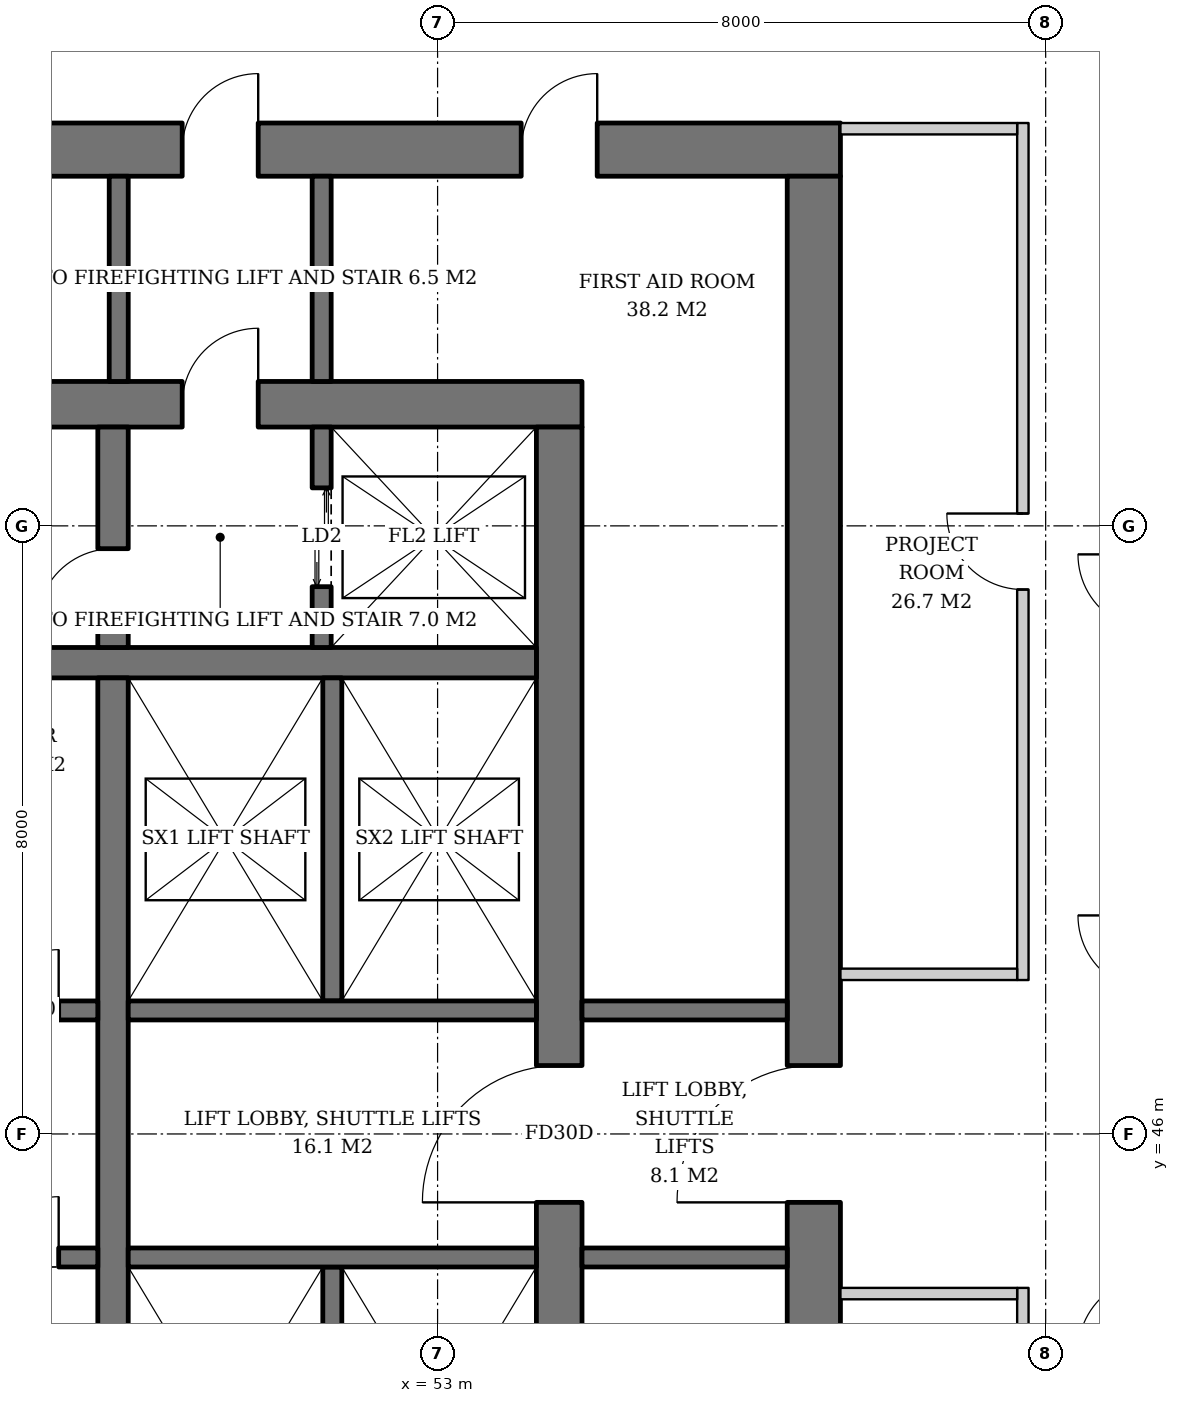
"""IFC4 building model, lengths in metres.
Left out: names, types, materials, properties, quantities, classifications, styles, units other than length and angle.
Written with IfcOpenShell. Run it as: python <this file> out.ifc"""

import sys

from ifc_helpers import new_model, si_unit, direction, frame, frame_2d, origin, place, context, subcontext, project, spatial, rectangle, extrude, element, fill, save


model = new_model("IFC4")
c1 = context("Model", 3, precision=1e-05, world=origin(), true_north=direction((0.0, 1.0)))
c2 = subcontext(c1, "Body", "Model", "MODEL_VIEW")
j1 = project(units=[si_unit("LENGTHUNIT", "METRE"), si_unit("PLANEANGLEUNIT", "RADIAN")], contexts=[c1])
p1 = place(None, origin())
s1 = spatial("IfcSite", under=j1, at=p1, CompositionType="ELEMENT")
p2 = place(p1, origin())
s2 = spatial("IfcBuilding", under=s1, at=p2, CompositionType="ELEMENT")
p3 = place(p2, frame((0.0, 0.0, 112.2)))
s3 = spatial("IfcBuildingStorey", under=s2, at=p3, CompositionType="ELEMENT", Elevation=112.2)
p4 = place(p3, frame((35.1, 55.6, 0.0), z_axis=(0.0, 0.0, 1.0), x_axis=(1.0, 0.0, 0.0)))
e1 = element("IfcWall", 1, at=p4, inside=s3, PredefinedType="SHEAR", context=c2, shape_type="SweptSolid", body=[
    extrude(rectangle(XDim=19.8, YDim=0.6, at=frame_2d((9.9, 0.0))), origin(), (0.0, 0.0, 1.0), 3.8),
])
p5 = place(p4, frame((14.54, 0.0, 0.0)))
e2 = element("IfcOpeningElement", 2, at=p5, cuts=e1, PredefinedType="OPENING", context=c2, shape_type="SweptSolid", body=[
    extrude(rectangle(XDim=1.0, YDim=2.1, at=frame_2d((0.5, 1.05))), frame((0.0, 0.31, 0.0), z_axis=(0.0, -1.0, 0.0), x_axis=(1.0, 0.0, 0.0)), (0.0, 0.0, 1.0), 0.62),
])
p6 = place(p4, frame((2.425, 0.0, 0.0)))
e3 = element("IfcOpeningElement", 3, at=p6, cuts=e1, PredefinedType="OPENING", context=c2, shape_type="SweptSolid", body=[
    extrude(rectangle(XDim=1.0, YDim=2.1, at=frame_2d((0.5, 1.05))), frame((0.0, 0.31, 0.0), z_axis=(0.0, -1.0, 0.0), x_axis=(1.0, 0.0, 0.0)), (0.0, 0.0, 1.0), 0.62),
])
p7 = place(p3, frame((54.6, 36.7, 0.0), z_axis=(0.0, 0.0, 1.0), x_axis=(0.0, 1.0, 0.0)))
e4 = element("IfcWall", 4, at=p7, inside=s3, PredefinedType="SHEAR", context=c2, shape_type="SweptSolid", body=[
    extrude(rectangle(XDim=18.6, YDim=0.6, at=frame_2d((9.3, 0.0))), origin(), (0.0, 0.0, 1.0), 3.8),
])
p8 = place(p7, frame((8.4, 0.0, 0.0)))
e5 = element("IfcOpeningElement", 5, at=p8, cuts=e4, PredefinedType="OPENING", context=c2, shape_type="SweptSolid", body=[
    extrude(rectangle(XDim=1.8, YDim=2.4, at=frame_2d((0.9, 1.2))), frame((0.0, 0.31, 0.0), z_axis=(0.0, -1.0, 0.0), x_axis=(1.0, 0.0, 0.0)), (0.0, 0.0, 1.0), 0.62),
])
p9 = place(p3, frame((31.7, 58.95, 0.0), z_axis=(0.0, 0.0, 1.0), x_axis=(1.0, 0.0, 0.0)))
e6 = element("IfcWall", 6, at=p9, inside=s3, PredefinedType="SHEAR", context=c2, shape_type="SweptSolid", body=[
    extrude(rectangle(XDim=26.6, YDim=0.7, at=frame_2d((13.3, 0.0))), origin(), (0.0, 0.0, 1.0), 3.8),
])
p10 = place(p9, frame((17.94, 0.0, 0.0)))
e7 = element("IfcOpeningElement", 7, at=p10, cuts=e6, PredefinedType="OPENING", context=c2, shape_type="SweptSolid", body=[
    extrude(rectangle(XDim=1.0, YDim=2.1, at=frame_2d((0.5, 1.05))), frame((0.0, 0.36, 0.0), z_axis=(0.0, -1.0, 0.0), x_axis=(1.0, 0.0, 0.0)), (0.0, 0.0, 1.0), 0.72),
])
p11 = place(p9, frame((5.825, 0.0, 0.0)))
e8 = element("IfcOpeningElement", 8, at=p11, cuts=e6, PredefinedType="OPENING", context=c2, shape_type="SweptSolid", body=[
    extrude(rectangle(XDim=1.0, YDim=2.1, at=frame_2d((0.5, 1.05))), frame((0.0, 0.36, 0.0), z_axis=(0.0, -1.0, 0.0), x_axis=(1.0, 0.0, 0.0)), (0.0, 0.0, 1.0), 0.72),
])
p12 = place(p9, frame((1.169, 0.0, 0.0)))
e9 = element("IfcOpeningElement", 9, at=p12, cuts=e6, PredefinedType="OPENING", context=c2, shape_type="SweptSolid", body=[
    extrude(rectangle(XDim=1.0, YDim=2.1, at=frame_2d((0.5, 1.05))), frame((0.0, 0.36, 0.0), z_axis=(0.0, -1.0, 0.0), x_axis=(1.0, 0.0, 0.0)), (0.0, 0.0, 1.0), 0.72),
])
p13 = place(p9, frame((2.683, 0.0, 0.0)))
e10 = element("IfcOpeningElement", 10, at=p13, cuts=e6, PredefinedType="OPENING", context=c2, shape_type="SweptSolid", body=[
    extrude(rectangle(XDim=1.0, YDim=2.1, at=frame_2d((0.5, 1.05))), frame((0.0, 0.36, 0.0), z_axis=(0.0, -1.0, 0.0), x_axis=(1.0, 0.0, 0.0)), (0.0, 0.0, 1.0), 0.72),
])
p14 = place(p9, frame((4.211, 0.0, 0.0)))
e11 = element("IfcOpeningElement", 11, at=p14, cuts=e6, PredefinedType="OPENING", context=c2, shape_type="SweptSolid", body=[
    extrude(rectangle(XDim=1.0, YDim=2.1, at=frame_2d((0.5, 1.05))), frame((0.0, 0.36, 0.0), z_axis=(0.0, -1.0, 0.0), x_axis=(1.0, 0.0, 0.0)), (0.0, 0.0, 1.0), 0.72),
])
p15 = place(p9, frame((9.126, 0.0, 0.0)))
e12 = element("IfcOpeningElement", 12, at=p15, cuts=e6, PredefinedType="OPENING", context=c2, shape_type="SweptSolid", body=[
    extrude(rectangle(XDim=1.0, YDim=2.1, at=frame_2d((0.5, 1.05))), frame((0.0, 0.36, 0.0), z_axis=(0.0, -1.0, 0.0), x_axis=(1.0, 0.0, 0.0)), (0.0, 0.0, 1.0), 0.72),
])
p16 = place(p9, frame((14.029, 0.0, 0.0)))
e13 = element("IfcOpeningElement", 13, at=p16, cuts=e6, PredefinedType="OPENING", context=c2, shape_type="SweptSolid", body=[
    extrude(rectangle(XDim=1.0, YDim=2.1, at=frame_2d((0.5, 1.05))), frame((0.0, 0.36, 0.0), z_axis=(0.0, -1.0, 0.0), x_axis=(1.0, 0.0, 0.0)), (0.0, 0.0, 1.0), 0.72),
])
p17 = place(p9, frame((22.4, 0.0, 0.0)))
e14 = element("IfcOpeningElement", 14, at=p17, cuts=e6, PredefinedType="OPENING", context=c2, shape_type="SweptSolid", body=[
    extrude(rectangle(XDim=1.0, YDim=2.1, at=frame_2d((0.5, 1.05))), frame((0.0, 0.36, 0.0), z_axis=(0.0, -1.0, 0.0), x_axis=(1.0, 0.0, 0.0)), (0.0, 0.0, 1.0), 0.72),
])
p18 = place(p3, frame((57.95, 33.4, 0.0), z_axis=(0.0, 0.0, 1.0), x_axis=(0.0, 1.0, 0.0)))
e15 = element("IfcWall", 15, at=p18, inside=s3, PredefinedType="SHEAR", context=c2, shape_type="SweptSolid", body=[
    extrude(rectangle(XDim=25.2, YDim=0.7, at=frame_2d((12.6, 0.0))), origin(), (0.0, 0.0, 1.0), 3.8),
])
p19 = place(p18, frame((11.7, 0.0, 0.0)))
e16 = element("IfcOpeningElement", 16, at=p19, cuts=e15, PredefinedType="OPENING", context=c2, shape_type="SweptSolid", body=[
    extrude(rectangle(XDim=1.8, YDim=2.4, at=frame_2d((0.9, 1.2))), frame((0.0, 0.36, 0.0), z_axis=(0.0, -1.0, 0.0), x_axis=(1.0, 0.0, 0.0)), (0.0, 0.0, 1.0), 0.72),
])
p20 = place(p3, frame((35.7, 52.2, 0.0), z_axis=(0.0, 0.0, 1.0), x_axis=(1.0, 0.0, 0.0)))
e17 = element("IfcWall", 17, at=p20, inside=s3, PredefinedType="SHEAR", context=c2, shape_type="SweptSolid", body=[
    extrude(rectangle(XDim=18.6, YDim=0.4, at=frame_2d((9.3, 0.0))), origin(), (0.0, 0.0, 1.0), 3.8),
])
p21 = place(p3, frame((48.73, 40.0, 0.0), z_axis=(0.0, 0.0, 1.0), x_axis=(0.0, 1.0, 0.0)))
e18 = element("IfcWall", 18, at=p21, inside=s3, PredefinedType="SHEAR", context=c2, shape_type="SweptSolid", body=[
    extrude(rectangle(XDim=12.0, YDim=0.4, at=frame_2d((6.0, 0.0))), origin(), (0.0, 0.0, 1.0), 3.8),
])
p22 = place(p3, frame((48.73, 52.4, 0.0), z_axis=(0.0, 0.0, 1.0), x_axis=(0.0, 1.0, 0.0)))
e19 = element("IfcWall", 19, at=p22, inside=s3, PredefinedType="SHEAR", context=c2, shape_type="SweptSolid", body=[
    extrude(rectangle(XDim=2.9, YDim=0.4, at=frame_2d((1.45, 0.0))), origin(), (0.0, 0.0, 1.0), 3.8),
])
p23 = place(p22, frame((0.3, 0.0, 0.0)))
e20 = element("IfcOpeningElement", 20, at=p23, cuts=e19, PredefinedType="OPENING", context=c2, shape_type="SweptSolid", body=[
    extrude(rectangle(XDim=1.0, YDim=2.1, at=frame_2d((0.5, 1.05))), frame((0.0, 0.21, 0.0), z_axis=(0.0, -1.0, 0.0), x_axis=(1.0, 0.0, 0.0)), (0.0, 0.0, 1.0), 0.42),
])
p24 = place(p3, frame((51.475, 52.4, 0.0), z_axis=(0.0, 0.0, 1.0), x_axis=(0.0, 1.0, 0.0)))
e21 = element("IfcWall", 21, at=p24, inside=s3, PredefinedType="SHEAR", context=c2, shape_type="SweptSolid", body=[
    extrude(rectangle(XDim=2.9, YDim=0.25, at=frame_2d((1.45, 0.0))), origin(), (0.0, 0.0, 1.0), 3.8),
])
p25 = place(p24, frame((0.8, 0.0, 0.0)))
e22 = element("IfcOpeningElement", 22, at=p25, cuts=e21, PredefinedType="OPENING", context=c2, shape_type="SweptSolid", body=[
    extrude(rectangle(XDim=1.3, YDim=2.2, at=frame_2d((0.65, 1.1))), frame((0.0, 0.135, 0.0), z_axis=(0.0, -1.0, 0.0), x_axis=(1.0, 0.0, 0.0)), (0.0, 0.0, 1.0), 0.27),
])
p26 = place(p3, frame((35.7, 47.625, 0.0), z_axis=(0.0, 0.0, 1.0), x_axis=(1.0, 0.0, 0.0)))
e23 = element("IfcWall", 23, at=p26, inside=s3, PredefinedType="SHEAR", context=c2, shape_type="SweptSolid", body=[
    extrude(rectangle(XDim=12.83, YDim=0.25, at=frame_2d((6.415, 0.0))), origin(), (0.0, 0.0, 1.0), 3.8),
])
p27 = place(p26, frame((0.7, 0.0, 0.0)))
e24 = element("IfcOpeningElement", 24, at=p27, cuts=e23, PredefinedType="OPENING", context=c2, shape_type="SweptSolid", body=[
    extrude(rectangle(XDim=1.1, YDim=2.2, at=frame_2d((0.55, 1.1))), frame((0.0, 0.135, 0.0), z_axis=(0.0, -1.0, 0.0), x_axis=(1.0, 0.0, 0.0)), (0.0, 0.0, 1.0), 0.27),
])
p28 = place(p26, frame((3.45, 0.0, 0.0)))
e25 = element("IfcOpeningElement", 25, at=p28, cuts=e23, PredefinedType="OPENING", context=c2, shape_type="SweptSolid", body=[
    extrude(rectangle(XDim=1.1, YDim=2.2, at=frame_2d((0.55, 1.1))), frame((0.0, 0.135, 0.0), z_axis=(0.0, -1.0, 0.0), x_axis=(1.0, 0.0, 0.0)), (0.0, 0.0, 1.0), 0.27),
])
p29 = place(p26, frame((6.2, 0.0, 0.0)))
e26 = element("IfcOpeningElement", 26, at=p29, cuts=e23, PredefinedType="OPENING", context=c2, shape_type="SweptSolid", body=[
    extrude(rectangle(XDim=1.1, YDim=2.2, at=frame_2d((0.55, 1.1))), frame((0.0, 0.135, 0.0), z_axis=(0.0, -1.0, 0.0), x_axis=(1.0, 0.0, 0.0)), (0.0, 0.0, 1.0), 0.27),
])
p30 = place(p26, frame((8.95, 0.0, 0.0)))
e27 = element("IfcOpeningElement", 27, at=p30, cuts=e23, PredefinedType="OPENING", context=c2, shape_type="SweptSolid", body=[
    extrude(rectangle(XDim=1.1, YDim=2.2, at=frame_2d((0.55, 1.1))), frame((0.0, 0.135, 0.0), z_axis=(0.0, -1.0, 0.0), x_axis=(1.0, 0.0, 0.0)), (0.0, 0.0, 1.0), 0.27),
])
p31 = place(p26, frame((11.515, 0.0, 0.0)))
e28 = element("IfcOpeningElement", 28, at=p31, cuts=e23, PredefinedType="OPENING", context=c2, shape_type="SweptSolid", body=[
    extrude(rectangle(XDim=0.8, YDim=2.0, at=frame_2d((0.4, 1.0))), frame((0.0, 0.135, 0.0), z_axis=(0.0, -1.0, 0.0), x_axis=(1.0, 0.0, 0.0)), (0.0, 0.0, 1.0), 0.27),
])
p32 = place(p3, frame((35.7, 44.375, 0.0), z_axis=(0.0, 0.0, 1.0), x_axis=(1.0, 0.0, 0.0)))
e29 = element("IfcWall", 29, at=p32, inside=s3, PredefinedType="SHEAR", context=c2, shape_type="SweptSolid", body=[
    extrude(rectangle(XDim=12.83, YDim=0.25, at=frame_2d((6.415, 0.0))), origin(), (0.0, 0.0, 1.0), 3.8),
])
p33 = place(p32, frame((0.7, 0.0, 0.0)))
e30 = element("IfcOpeningElement", 30, at=p33, cuts=e29, PredefinedType="OPENING", context=c2, shape_type="SweptSolid", body=[
    extrude(rectangle(XDim=1.1, YDim=2.2, at=frame_2d((0.55, 1.1))), frame((0.0, 0.135, 0.0), z_axis=(0.0, -1.0, 0.0), x_axis=(1.0, 0.0, 0.0)), (0.0, 0.0, 1.0), 0.27),
])
p34 = place(p32, frame((3.45, 0.0, 0.0)))
e31 = element("IfcOpeningElement", 31, at=p34, cuts=e29, PredefinedType="OPENING", context=c2, shape_type="SweptSolid", body=[
    extrude(rectangle(XDim=1.1, YDim=2.2, at=frame_2d((0.55, 1.1))), frame((0.0, 0.135, 0.0), z_axis=(0.0, -1.0, 0.0), x_axis=(1.0, 0.0, 0.0)), (0.0, 0.0, 1.0), 0.27),
])
p35 = place(p32, frame((6.2, 0.0, 0.0)))
e32 = element("IfcOpeningElement", 32, at=p35, cuts=e29, PredefinedType="OPENING", context=c2, shape_type="SweptSolid", body=[
    extrude(rectangle(XDim=1.1, YDim=2.2, at=frame_2d((0.55, 1.1))), frame((0.0, 0.135, 0.0), z_axis=(0.0, -1.0, 0.0), x_axis=(1.0, 0.0, 0.0)), (0.0, 0.0, 1.0), 0.27),
])
p36 = place(p32, frame((8.95, 0.0, 0.0)))
e33 = element("IfcOpeningElement", 33, at=p36, cuts=e29, PredefinedType="OPENING", context=c2, shape_type="SweptSolid", body=[
    extrude(rectangle(XDim=1.1, YDim=2.2, at=frame_2d((0.55, 1.1))), frame((0.0, 0.135, 0.0), z_axis=(0.0, -1.0, 0.0), x_axis=(1.0, 0.0, 0.0)), (0.0, 0.0, 1.0), 0.27),
])
p37 = place(p32, frame((11.515, 0.0, 0.0)))
e34 = element("IfcOpeningElement", 34, at=p37, cuts=e29, PredefinedType="OPENING", context=c2, shape_type="SweptSolid", body=[
    extrude(rectangle(XDim=0.8, YDim=2.0, at=frame_2d((0.4, 1.0))), frame((0.0, 0.135, 0.0), z_axis=(0.0, -1.0, 0.0), x_axis=(1.0, 0.0, 0.0)), (0.0, 0.0, 1.0), 0.27),
])
p38 = place(p3, frame((51.615, 47.75, 0.0), z_axis=(0.0, 0.0, 1.0), x_axis=(0.0, 1.0, 0.0)))
e35 = element("IfcWall", 35, at=p38, inside=s3, PredefinedType="SHEAR", context=c2, shape_type="SweptSolid", body=[
    extrude(rectangle(XDim=4.25, YDim=0.25, at=frame_2d((2.125, 0.0))), origin(), (0.0, 0.0, 1.0), 3.8),
])
p39 = place(p3, frame((48.93, 47.625, 0.0), z_axis=(0.0, 0.0, 1.0), x_axis=(1.0, 0.0, 0.0)))
e36 = element("IfcWall", 36, at=p39, inside=s3, PredefinedType="SHEAR", context=c2, shape_type="SweptSolid", body=[
    extrude(rectangle(XDim=5.37, YDim=0.25, at=frame_2d((2.685, 0.0))), origin(), (0.0, 0.0, 1.0), 3.8),
])
p40 = place(p3, frame((51.615, 44.25, 0.0), z_axis=(0.0, 0.0, 1.0), x_axis=(0.0, -1.0, 0.0)))
e37 = element("IfcWall", 37, at=p40, inside=s3, PredefinedType="SHEAR", context=c2, shape_type="SweptSolid", body=[
    extrude(rectangle(XDim=4.25, YDim=0.25, at=frame_2d((2.125, 0.0))), origin(), (0.0, 0.0, 1.0), 3.8),
])
p41 = place(p3, frame((48.93, 44.375, 0.0), z_axis=(0.0, 0.0, 1.0), x_axis=(1.0, 0.0, 0.0)))
e38 = element("IfcWall", 38, at=p41, inside=s3, PredefinedType="SHEAR", context=c2, shape_type="SweptSolid", body=[
    extrude(rectangle(XDim=5.37, YDim=0.25, at=frame_2d((2.685, 0.0))), origin(), (0.0, 0.0, 1.0), 3.8),
])
for number, where, z_axis, x_axis in (
    (39, (48.805, 55.9, 0.0), (0.0, 0.0, 1.0), (0.0, 1.0, 0.0)),
    (40, (51.475, 55.9, 0.0), (0.0, 0.0, 1.0), (0.0, 1.0, 0.0)),
    (41, (54.9, 44.375, 0.0), (0.0, 0.0, 1.0), (1.0, 0.0, 0.0)),
    (42, (54.9, 47.625, 0.0), (0.0, 0.0, 1.0), (1.0, 0.0, 0.0)),
):
    element("IfcWall", number, at=place(p3, frame(where, z_axis=z_axis, x_axis=x_axis)), inside=s3, PredefinedType="SOLIDWALL", context=c2, shape_type="SweptSolid", body=[
        extrude(rectangle(XDim=2.7, YDim=0.25, at=frame_2d((1.35, 0.0))), origin(), (0.0, 0.0, 1.0), 3.62),
    ])
p42 = place(p3, frame((60.7, 32.7, 0.0), z_axis=(0.0, 0.0, 1.0), x_axis=(0.0, 1.0, 0.0)))
e43 = element("IfcWall", 43, at=p42, inside=s3, PredefinedType="PARTITIONING", context=c2, shape_type="SweptSolid", body=[
    extrude(rectangle(XDim=11.275, YDim=0.15, at=frame_2d((5.638, 0.0))), origin(), (0.0, 0.0, 1.0), 2.72),
])
p43 = place(p42, frame((5.137, 0.0, 0.0)))
e44 = element("IfcOpeningElement", 44, at=p43, cuts=e43, PredefinedType="OPENING", context=c2, shape_type="SweptSolid", body=[
    extrude(rectangle(XDim=1.0, YDim=2.1, at=frame_2d((0.5, 1.05))), frame((0.0, 0.085, 0.0), z_axis=(0.0, -1.0, 0.0), x_axis=(1.0, 0.0, 0.0)), (0.0, 0.0, 1.0), 0.17),
])
p44 = place(p3, frame((58.3, 43.9, 0.0), z_axis=(0.0, 0.0, 1.0), x_axis=(1.0, 0.0, 0.0)))
e45 = element("IfcWall", 45, at=p44, inside=s3, PredefinedType="PARTITIONING", context=c2, shape_type="SweptSolid", body=[
    extrude(rectangle(XDim=2.325, YDim=0.15, at=frame_2d((1.163, 0.0))), origin(), (0.0, 0.0, 1.0), 3.62),
])
p45 = place(p3, frame((60.7, 48.025, 0.0), z_axis=(0.0, 0.0, 1.0), x_axis=(0.0, 1.0, 0.0)))
e46 = element("IfcWall", 46, at=p45, inside=s3, PredefinedType="PARTITIONING", context=c2, shape_type="SweptSolid", body=[
    extrude(rectangle(XDim=11.275, YDim=0.15, at=frame_2d((5.638, 0.0))), origin(), (0.0, 0.0, 1.0), 2.806),
])
p46 = place(p45, frame((5.137, 0.0, 0.0)))
e47 = element("IfcOpeningElement", 47, at=p46, cuts=e46, PredefinedType="OPENING", context=c2, shape_type="SweptSolid", body=[
    extrude(rectangle(XDim=1.0, YDim=2.1, at=frame_2d((0.5, 1.05))), frame((0.0, 0.085, 0.0), z_axis=(0.0, -1.0, 0.0), x_axis=(1.0, 0.0, 0.0)), (0.0, 0.0, 1.0), 0.17),
])
for number, where, z_axis, x_axis in (
    (48, (58.3, 48.1, 0.0), (0.0, 0.0, 1.0), (1.0, 0.0, 0.0)),
    (49, (58.3, 59.225, 0.0), (0.0, 0.0, 1.0), (1.0, 0.0, 0.0)),
):
    element("IfcWall", number, at=place(p3, frame(where, z_axis=z_axis, x_axis=x_axis)), inside=s3, PredefinedType="PARTITIONING", context=c2, shape_type="SweptSolid", body=[
        extrude(rectangle(XDim=2.325, YDim=0.15, at=frame_2d((1.163, 0.0))), origin(), (0.0, 0.0, 1.0), 3.62),
    ])
p47 = place(p25, origin())
e50 = element("IfcDoor", 50, at=p47, inside=s3, OperationType="DOUBLE_DOOR_SLIDING", PredefinedType="DOOR", context=c2, shape_type="SweptSolid", body=[
    extrude(rectangle(XDim=1.3, YDim=2.2, at=frame_2d((0.65, 1.1))), frame((0.0, 0.025, 0.0), z_axis=(0.0, -1.0, 0.0), x_axis=(1.0, 0.0, 0.0)), (0.0, 0.0, 1.0), 0.05),
])
fill(e22, e50)
p48 = place(p31, origin())
e51 = element("IfcDoor", 51, at=p48, inside=s3, OperationType="SINGLE_SWING_RIGHT", PredefinedType="DOOR", context=c2, shape_type="SweptSolid", body=[
    extrude(rectangle(XDim=0.8, YDim=2.0, at=frame_2d((0.4, 1.0))), frame((0.0, 0.025, 0.0), z_axis=(0.0, -1.0, 0.0), x_axis=(1.0, 0.0, 0.0)), (0.0, 0.0, 1.0), 0.05),
])
fill(e28, e51)
p49 = place(p37, origin())
e52 = element("IfcDoor", 52, at=p49, inside=s3, OperationType="SINGLE_SWING_RIGHT", PredefinedType="DOOR", context=c2, shape_type="SweptSolid", body=[
    extrude(rectangle(XDim=0.8, YDim=2.0, at=frame_2d((0.4, 1.0))), frame((0.0, 0.025, 0.0), z_axis=(0.0, -1.0, 0.0), x_axis=(1.0, 0.0, 0.0)), (0.0, 0.0, 1.0), 0.05),
])
fill(e34, e52)
p50 = place(p23, origin())
e53 = element("IfcDoor", 53, at=p50, inside=s3, OperationType="SINGLE_SWING_LEFT", PredefinedType="DOOR", context=c2, shape_type="SweptSolid", body=[
    extrude(rectangle(XDim=1.0, YDim=2.1, at=frame_2d((0.5, 1.05))), frame((0.0, 0.025, 0.0), z_axis=(0.0, -1.0, 0.0), x_axis=(1.0, 0.0, 0.0)), (0.0, 0.0, 1.0), 0.05),
])
fill(e20, e53)
p51 = place(p5, origin())
e54 = element("IfcDoor", 54, at=p51, inside=s3, OperationType="SINGLE_SWING_RIGHT", PredefinedType="DOOR", context=c2, shape_type="SweptSolid", body=[
    extrude(rectangle(XDim=1.0, YDim=2.1, at=frame_2d((0.5, 1.05))), frame((0.0, 0.025, 0.0), z_axis=(0.0, -1.0, 0.0), x_axis=(1.0, 0.0, 0.0)), (0.0, 0.0, 1.0), 0.05),
])
fill(e2, e54)
p52 = place(p8, origin())
e55 = element("IfcDoor", 55, at=p52, inside=s3, OperationType="DOUBLE_DOOR_SINGLE_SWING", PredefinedType="DOOR", context=c2, shape_type="SweptSolid", body=[
    extrude(rectangle(XDim=1.8, YDim=2.4, at=frame_2d((0.9, 1.2))), frame((0.0, 0.025, 0.0), z_axis=(0.0, -1.0, 0.0), x_axis=(1.0, 0.0, 0.0)), (0.0, 0.0, 1.0), 0.05),
])
fill(e5, e55)
p53 = place(p19, origin())
e56 = element("IfcDoor", 56, at=p53, inside=s3, OperationType="DOUBLE_DOOR_SINGLE_SWING", PredefinedType="DOOR", context=c2, shape_type="SweptSolid", body=[
    extrude(rectangle(XDim=1.8, YDim=2.4, at=frame_2d((0.9, 1.2))), frame((0.0, 0.025, 0.0), z_axis=(0.0, -1.0, 0.0), x_axis=(1.0, 0.0, 0.0)), (0.0, 0.0, 1.0), 0.05),
])
fill(e16, e56)
p54 = place(p10, origin())
e57 = element("IfcDoor", 57, at=p54, inside=s3, OperationType="SINGLE_SWING_RIGHT", PredefinedType="DOOR", context=c2, shape_type="SweptSolid", body=[
    extrude(rectangle(XDim=1.0, YDim=2.1, at=frame_2d((0.5, 1.05))), frame((0.0, 0.025, 0.0), z_axis=(0.0, -1.0, 0.0), x_axis=(1.0, 0.0, 0.0)), (0.0, 0.0, 1.0), 0.05),
])
fill(e7, e57)
p55 = place(p17, origin())
e58 = element("IfcDoor", 58, at=p55, inside=s3, OperationType="SINGLE_SWING_RIGHT", PredefinedType="DOOR", context=c2, shape_type="SweptSolid", body=[
    extrude(rectangle(XDim=1.0, YDim=2.1, at=frame_2d((0.5, 1.05))), frame((0.0, -0.29, 0.0), z_axis=(0.0, -1.0, 0.0), x_axis=(1.0, 0.0, 0.0)), (0.0, 0.0, 1.0), 0.05),
])
fill(e14, e58)
p56 = place(p46, origin())
e59 = element("IfcDoor", 59, at=p56, inside=s3, OperationType="SINGLE_SWING_RIGHT", PredefinedType="DOOR", context=c2, shape_type="SweptSolid", body=[
    extrude(rectangle(XDim=1.0, YDim=2.1, at=frame_2d((0.5, 1.05))), frame((0.0, 0.025, 0.0), z_axis=(0.0, -1.0, 0.0), x_axis=(1.0, 0.0, 0.0)), (0.0, 0.0, 1.0), 0.05),
])
fill(e47, e59)
save(model, sys.argv[1])
